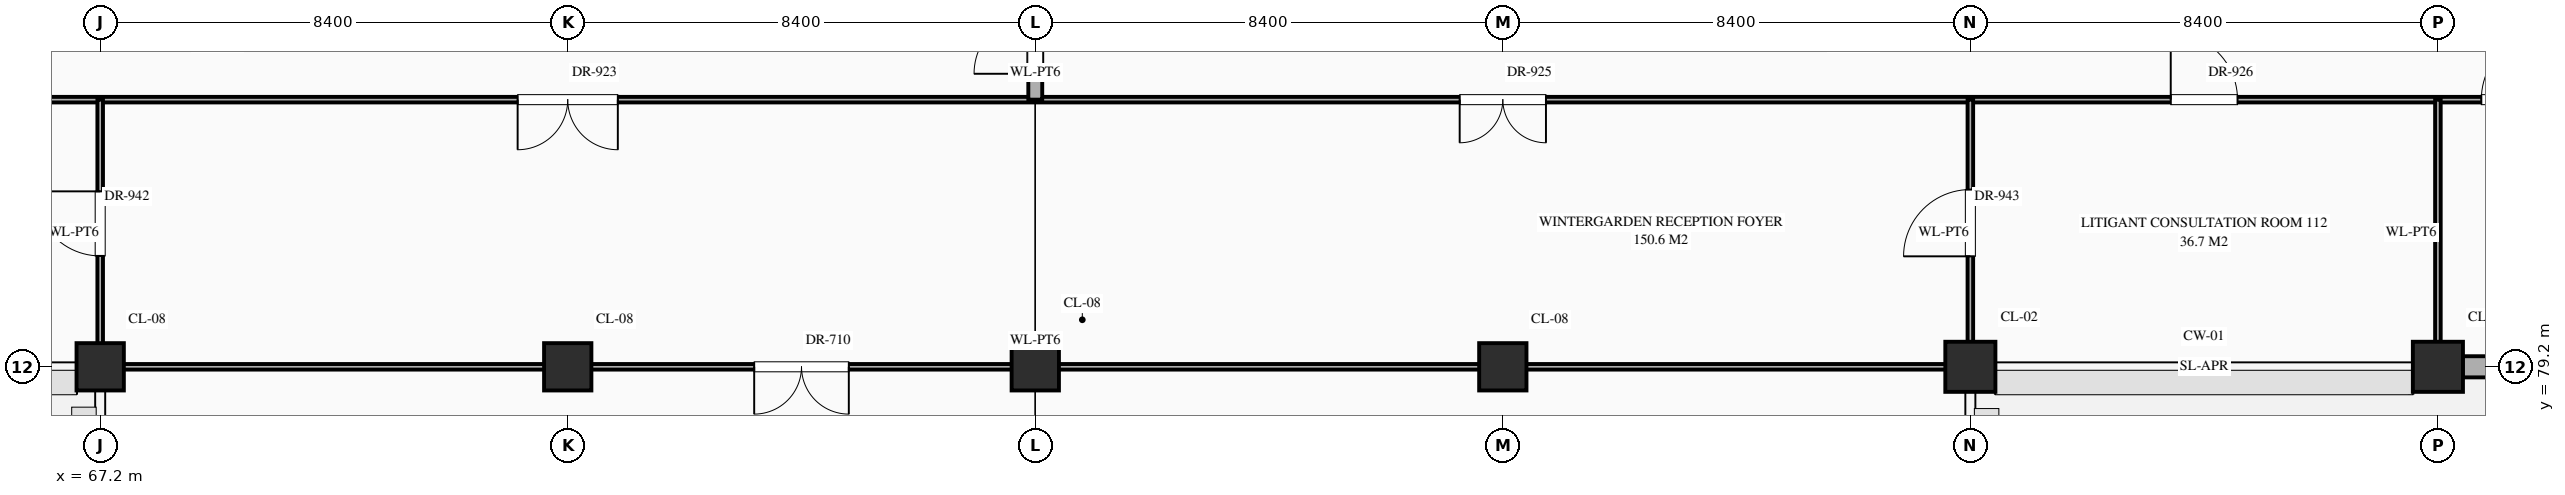
"""IFC4 building model, lengths in metres.
Left out: names, types, materials, properties, quantities, classifications, styles, units other than length and angle.
Written with IfcOpenShell. Run it as: python <this file> out.ifc"""

import sys

from ifc_helpers import new_model, si_unit, direction, frame, frame_2d, origin, origin_2d, place, context, subcontext, project, spatial, rectangle, circle, extrude, element, fill, save


model = new_model("IFC4")
c1 = context("Model", 3, precision=1e-05, world=origin(), true_north=direction((0.0, 1.0)))
c2 = subcontext(c1, "Body", "Model", "MODEL_VIEW")
j1 = project(units=[si_unit("LENGTHUNIT", "METRE"), si_unit("PLANEANGLEUNIT", "RADIAN")], contexts=[c1])
p1 = place(None, origin())
s1 = spatial("IfcSite", under=j1, at=p1, CompositionType="ELEMENT")
p2 = place(p1, origin())
s2 = spatial("IfcBuilding", under=s1, at=p2, CompositionType="ELEMENT")
p3 = place(p2, origin())
s3 = spatial("IfcBuildingStorey", under=s2, at=p3, CompositionType="ELEMENT", Elevation=0.0)
for number, where, z_axis, x_axis in (
    (1, (67.2, 79.2, 0.0), (0.0, 0.0, 1.0), (1.0, 0.0, 0.0)),
    (2, (75.6, 79.2, 0.0), (0.0, 0.0, 1.0), (1.0, 0.0, 0.0)),
    (3, (84.0, 79.2, 0.0), (0.0, 0.0, 1.0), (1.0, 0.0, 0.0)),
    (4, (92.4, 79.2, 0.0), (0.0, 0.0, 1.0), (1.0, 0.0, 0.0)),
):
    element("IfcColumn", number, at=place(p3, frame(where, z_axis=z_axis, x_axis=x_axis)), inside=s3, PredefinedType="COLUMN", context=c2, shape_type="SweptSolid", body=[
        extrude(circle(Radius=0.425, at=origin_2d()), origin(), (0.0, 0.0, 1.0), 5.4),
    ])
for number, where, z_axis, x_axis in (
    (5, (100.8, 79.2, 0.0), (0.0, 0.0, 1.0), (1.0, 0.0, 0.0)),
    (6, (109.2, 79.2, 0.0), (0.0, 0.0, 1.0), (1.0, 0.0, 0.0)),
):
    element("IfcColumn", number, at=place(p3, frame(where, z_axis=z_axis, x_axis=x_axis)), inside=s3, PredefinedType="COLUMN", context=c2, shape_type="SweptSolid", body=[
        extrude(rectangle(XDim=0.9, YDim=0.9, at=origin_2d()), origin(), (0.0, 0.0, 1.0), 5.4),
    ])
p4 = place(p3, frame((109.645, 79.2, 0.0), z_axis=(0.0, 0.0, 1.0), x_axis=(1.0, 0.0, 0.0)))
e7 = element("IfcWall", 7, at=p4, inside=s3, PredefinedType="STANDARD", context=c2, shape_type="SweptSolid", body=[
    extrude(rectangle(XDim=7.51, YDim=0.38, at=frame_2d((3.755, 0.0))), origin(), (0.0, 0.0, 1.0), 4.47),
])
p5 = place(p4, frame((3.155, 0.0, 0.0)))
e8 = element("IfcOpeningElement", 8, at=p5, cuts=e7, PredefinedType="OPENING", context=c2, shape_type="SweptSolid", body=[
    extrude(rectangle(XDim=1.2, YDim=2.2, at=frame_2d((0.6, 1.1))), frame((0.0, 0.202, 0.0), z_axis=(0.0, -1.0, 0.0), x_axis=(1.0, 0.0, 0.0)), (0.0, 0.0, 1.0), 0.404),
])
p6 = place(p3, frame((67.24, 79.2, 0.0), z_axis=(0.0, 0.0, 1.0), x_axis=(1.0, 0.0, 0.0)))
e9 = element("IfcWall", 9, at=p6, inside=s3, PredefinedType="STANDARD", context=c2, shape_type="SweptSolid", body=[
    extrude(rectangle(XDim=33.52, YDim=0.1, at=frame_2d((16.76, 0.0))), origin(), (0.0, 0.0, 1.0), 4.27),
])
p7 = place(p6, frame((11.71, 0.0, 0.0)))
e10 = element("IfcOpeningElement", 10, at=p7, cuts=e9, PredefinedType="OPENING", context=c2, shape_type="SweptSolid", body=[
    extrude(rectangle(XDim=1.7, YDim=2.45, at=frame_2d((0.85, 1.225))), frame((0.0, 0.062, 0.0), z_axis=(0.0, -1.0, 0.0), x_axis=(1.0, 0.0, 0.0)), (0.0, 0.0, 1.0), 0.124),
])
p8 = place(p3, frame((56.0, 84.0, 0.0), z_axis=(0.0, 0.0, 1.0), x_axis=(1.0, 0.0, 0.0)))
e11 = element("IfcWall", 11, at=p8, inside=s3, PredefinedType="STANDARD", context=c2, shape_type="SweptSolid", body=[
    extrude(rectangle(XDim=56.0, YDim=0.1, at=frame_2d((28.0, 0.0))), origin(), (0.0, 0.0, 1.0), 5.12),
])
p9 = place(p8, frame((0.9, 0.0, 0.0)))
e12 = element("IfcOpeningElement", 12, at=p9, cuts=e11, PredefinedType="OPENING", context=c2, shape_type="SweptSolid", body=[
    extrude(rectangle(XDim=1.0, YDim=2.25, at=frame_2d((0.5, 1.125))), frame((0.0, 0.062, 0.0), z_axis=(0.0, -1.0, 0.0), x_axis=(1.0, 0.0, 0.0)), (0.0, 0.0, 1.0), 0.124),
])
p10 = place(p8, frame((6.48, 0.0, 0.0)))
e13 = element("IfcOpeningElement", 13, at=p10, cuts=e11, PredefinedType="OPENING", context=c2, shape_type="SweptSolid", body=[
    extrude(rectangle(XDim=1.04, YDim=2.2, at=frame_2d((0.52, 1.1))), frame((0.0, 0.062, 0.0), z_axis=(0.0, -1.0, 0.0), x_axis=(1.0, 0.0, 0.0)), (0.0, 0.0, 1.0), 0.124),
])
p11 = place(p8, frame((18.7, 0.0, 0.0)))
e14 = element("IfcOpeningElement", 14, at=p11, cuts=e11, PredefinedType="OPENING", context=c2, shape_type="SweptSolid", body=[
    extrude(rectangle(XDim=1.8, YDim=2.5, at=frame_2d((0.9, 1.25))), frame((0.0, 0.062, 0.0), z_axis=(0.0, -1.0, 0.0), x_axis=(1.0, 0.0, 0.0)), (0.0, 0.0, 1.0), 0.124),
])
p12 = place(p8, frame((35.625, 0.0, 0.0)))
e15 = element("IfcOpeningElement", 15, at=p12, cuts=e11, PredefinedType="OPENING", context=c2, shape_type="SweptSolid", body=[
    extrude(rectangle(XDim=1.55, YDim=2.35, at=frame_2d((0.775, 1.175))), frame((0.0, 0.062, 0.0), z_axis=(0.0, -1.0, 0.0), x_axis=(1.0, 0.0, 0.0)), (0.0, 0.0, 1.0), 0.124),
])
p13 = place(p8, frame((48.4, 0.0, 0.0)))
e16 = element("IfcOpeningElement", 16, at=p13, cuts=e11, PredefinedType="OPENING", context=c2, shape_type="SweptSolid", body=[
    extrude(rectangle(XDim=1.2, YDim=2.35, at=frame_2d((0.6, 1.175))), frame((0.0, 0.062, 0.0), z_axis=(0.0, -1.0, 0.0), x_axis=(1.0, 0.0, 0.0)), (0.0, 0.0, 1.0), 0.124),
])
p14 = place(p8, frame((53.98, 0.0, 0.0)))
e17 = element("IfcOpeningElement", 17, at=p14, cuts=e11, PredefinedType="OPENING", context=c2, shape_type="SweptSolid", body=[
    extrude(rectangle(XDim=1.24, YDim=2.3, at=frame_2d((0.62, 1.15))), frame((0.0, 0.062, 0.0), z_axis=(0.0, -1.0, 0.0), x_axis=(1.0, 0.0, 0.0)), (0.0, 0.0, 1.0), 0.124),
])
p15 = place(p3, frame((67.2, 79.24, 0.0), z_axis=(0.0, 0.0, 1.0), x_axis=(0.0, 1.0, 0.0)))
e18 = element("IfcWall", 18, at=p15, inside=s3, PredefinedType="STANDARD", context=c2, shape_type="SweptSolid", body=[
    extrude(rectangle(XDim=4.76, YDim=0.1, at=frame_2d((2.38, 0.0))), origin(), (0.0, 0.0, 1.0), 4.37),
])
p16 = place(p15, frame((1.952, 0.0, 0.0)))
e19 = element("IfcOpeningElement", 19, at=p16, cuts=e18, PredefinedType="OPENING", context=c2, shape_type="SweptSolid", body=[
    extrude(rectangle(XDim=1.16, YDim=2.3, at=frame_2d((0.58, 1.15))), frame((0.0, 0.062, 0.0), z_axis=(0.0, -1.0, 0.0), x_axis=(1.0, 0.0, 0.0)), (0.0, 0.0, 1.0), 0.124),
])
p17 = place(p3, frame((84.0, 84.0, 0.0), z_axis=(0.0, 0.0, 1.0), x_axis=(0.0, 1.0, 0.0)))
e20 = element("IfcWall", 20, at=p17, inside=s3, PredefinedType="STANDARD", context=c2, shape_type="SweptSolid", body=[
    extrude(rectangle(XDim=12.0, YDim=0.25, at=frame_2d((6.0, 0.0))), origin(), (0.0, 0.0, 1.0), 4.37),
])
p18 = place(p17, frame((7.715, 0.0, 0.0)))
e21 = element("IfcOpeningElement", 21, at=p18, cuts=e20, PredefinedType="OPENING", context=c2, shape_type="SweptSolid", body=[
    extrude(rectangle(XDim=1.0, YDim=2.2, at=frame_2d((0.5, 1.1))), frame((0.0, 0.137, 0.0), z_axis=(0.0, -1.0, 0.0), x_axis=(1.0, 0.0, 0.0)), (0.0, 0.0, 1.0), 0.274),
])
p19 = place(p17, frame((10.485, 0.0, 0.0)))
e22 = element("IfcOpeningElement", 22, at=p19, cuts=e20, PredefinedType="OPENING", context=c2, shape_type="SweptSolid", body=[
    extrude(rectangle(XDim=1.0, YDim=2.2, at=frame_2d((0.5, 1.1))), frame((0.0, 0.137, 0.0), z_axis=(0.0, -1.0, 0.0), x_axis=(1.0, 0.0, 0.0)), (0.0, 0.0, 1.0), 0.274),
])
p20 = place(p17, frame((0.465, 0.0, 0.0)))
e23 = element("IfcOpeningElement", 23, at=p20, cuts=e20, PredefinedType="OPENING", context=c2, shape_type="SweptSolid", body=[
    extrude(rectangle(XDim=1.1, YDim=2.2, at=frame_2d((0.55, 1.1))), frame((0.0, 0.137, 0.0), z_axis=(0.0, -1.0, 0.0), x_axis=(1.0, 0.0, 0.0)), (0.0, 0.0, 1.0), 0.274),
])
p21 = place(p3, frame((100.8, 79.24, 0.0), z_axis=(0.0, 0.0, 1.0), x_axis=(0.0, 1.0, 0.0)))
e24 = element("IfcWall", 24, at=p21, inside=s3, PredefinedType="STANDARD", context=c2, shape_type="SweptSolid", body=[
    extrude(rectangle(XDim=4.76, YDim=0.1, at=frame_2d((2.38, 0.0))), origin(), (0.0, 0.0, 1.0), 4.37),
])
p22 = place(p21, frame((1.945, 0.0, 0.0)))
e25 = element("IfcOpeningElement", 25, at=p22, cuts=e24, PredefinedType="OPENING", context=c2, shape_type="SweptSolid", body=[
    extrude(rectangle(XDim=1.2, YDim=2.35, at=frame_2d((0.6, 1.175))), frame((0.0, 0.062, 0.0), z_axis=(0.0, -1.0, 0.0), x_axis=(1.0, 0.0, 0.0)), (0.0, 0.0, 1.0), 0.124),
])
p23 = place(p3, frame((109.2, 79.24, 0.0), z_axis=(0.0, 0.0, 1.0), x_axis=(0.0, 1.0, 0.0)))
e26 = element("IfcWall", 26, at=p23, inside=s3, PredefinedType="STANDARD", context=c2, shape_type="SweptSolid", body=[
    extrude(rectangle(XDim=4.76, YDim=0.1, at=frame_2d((2.38, 0.0))), origin(), (0.0, 0.0, 1.0), 4.37),
])
p24 = place(p7, frame((1.7, 0.0, 0.0), z_axis=(0.0, 0.0, 1.0), x_axis=(-1.0, 0.0, 0.0)))
e27 = element("IfcDoor", 27, at=p24, inside=s3, OperationType="DOUBLE_DOOR_SINGLE_SWING", PredefinedType="DOOR", context=c2, shape_type="SweptSolid", body=[
    extrude(rectangle(XDim=1.7, YDim=2.45, at=frame_2d((0.85, 1.225))), frame((0.0, 0.025, 0.0), z_axis=(0.0, -1.0, 0.0), x_axis=(1.0, 0.0, 0.0)), (0.0, 0.0, 1.0), 0.05),
])
fill(e10, e27)
p25 = place(p20, origin())
e28 = element("IfcDoor", 28, at=p25, inside=s3, OperationType="SINGLE_SWING_LEFT", PredefinedType="DOOR", context=c2, shape_type="SweptSolid", body=[
    extrude(rectangle(XDim=1.1, YDim=2.2, at=frame_2d((0.55, 1.1))), frame((0.0, 0.025, 0.0), z_axis=(0.0, -1.0, 0.0), x_axis=(1.0, 0.0, 0.0)), (0.0, 0.0, 1.0), 0.05),
])
fill(e23, e28)
p26 = place(p11, frame((1.8, 0.0, 0.0), z_axis=(0.0, 0.0, 1.0), x_axis=(-1.0, 0.0, 0.0)))
e29 = element("IfcDoor", 29, at=p26, inside=s3, OperationType="DOUBLE_DOOR_SINGLE_SWING", PredefinedType="DOOR", context=c2, shape_type="SweptSolid", body=[
    extrude(rectangle(XDim=1.8, YDim=2.5, at=frame_2d((0.9, 1.25))), frame((0.0, 0.025, 0.0), z_axis=(0.0, -1.0, 0.0), x_axis=(1.0, 0.0, 0.0)), (0.0, 0.0, 1.0), 0.05),
])
fill(e14, e29)
p27 = place(p12, frame((1.55, 0.0, 0.0), z_axis=(0.0, 0.0, 1.0), x_axis=(-1.0, 0.0, 0.0)))
e30 = element("IfcDoor", 30, at=p27, inside=s3, OperationType="DOUBLE_DOOR_SINGLE_SWING", PredefinedType="DOOR", context=c2, shape_type="SweptSolid", body=[
    extrude(rectangle(XDim=1.55, YDim=2.35, at=frame_2d((0.775, 1.175))), frame((0.0, 0.025, 0.0), z_axis=(0.0, -1.0, 0.0), x_axis=(1.0, 0.0, 0.0)), (0.0, 0.0, 1.0), 0.05),
])
fill(e15, e30)
p28 = place(p13, origin())
e31 = element("IfcDoor", 31, at=p28, inside=s3, OperationType="SINGLE_SWING_LEFT", PredefinedType="DOOR", context=c2, shape_type="SweptSolid", body=[
    extrude(rectangle(XDim=1.2, YDim=2.35, at=frame_2d((0.6, 1.175))), frame((0.0, 0.025, 0.0), z_axis=(0.0, -1.0, 0.0), x_axis=(1.0, 0.0, 0.0)), (0.0, 0.0, 1.0), 0.05),
])
fill(e16, e31)
p29 = place(p14, origin())
e32 = element("IfcDoor", 32, at=p29, inside=s3, OperationType="SINGLE_SWING_RIGHT", PredefinedType="DOOR", context=c2, shape_type="SweptSolid", body=[
    extrude(rectangle(XDim=1.24, YDim=2.3, at=frame_2d((0.62, 1.15))), frame((0.0, 0.025, 0.0), z_axis=(0.0, -1.0, 0.0), x_axis=(1.0, 0.0, 0.0)), (0.0, 0.0, 1.0), 0.05),
])
fill(e17, e32)
p30 = place(p16, origin())
e33 = element("IfcDoor", 33, at=p30, inside=s3, OperationType="SINGLE_SWING_RIGHT", PredefinedType="DOOR", context=c2, shape_type="SweptSolid", body=[
    extrude(rectangle(XDim=1.16, YDim=2.3, at=frame_2d((0.58, 1.15))), frame((0.0, 0.025, 0.0), z_axis=(0.0, -1.0, 0.0), x_axis=(1.0, 0.0, 0.0)), (0.0, 0.0, 1.0), 0.05),
])
fill(e19, e33)
p31 = place(p22, origin())
e34 = element("IfcDoor", 34, at=p31, inside=s3, OperationType="SINGLE_SWING_LEFT", PredefinedType="DOOR", context=c2, shape_type="SweptSolid", body=[
    extrude(rectangle(XDim=1.2, YDim=2.35, at=frame_2d((0.6, 1.175))), frame((0.0, 0.025, 0.0), z_axis=(0.0, -1.0, 0.0), x_axis=(1.0, 0.0, 0.0)), (0.0, 0.0, 1.0), 0.05),
])
fill(e25, e34)
save(model, sys.argv[1])
